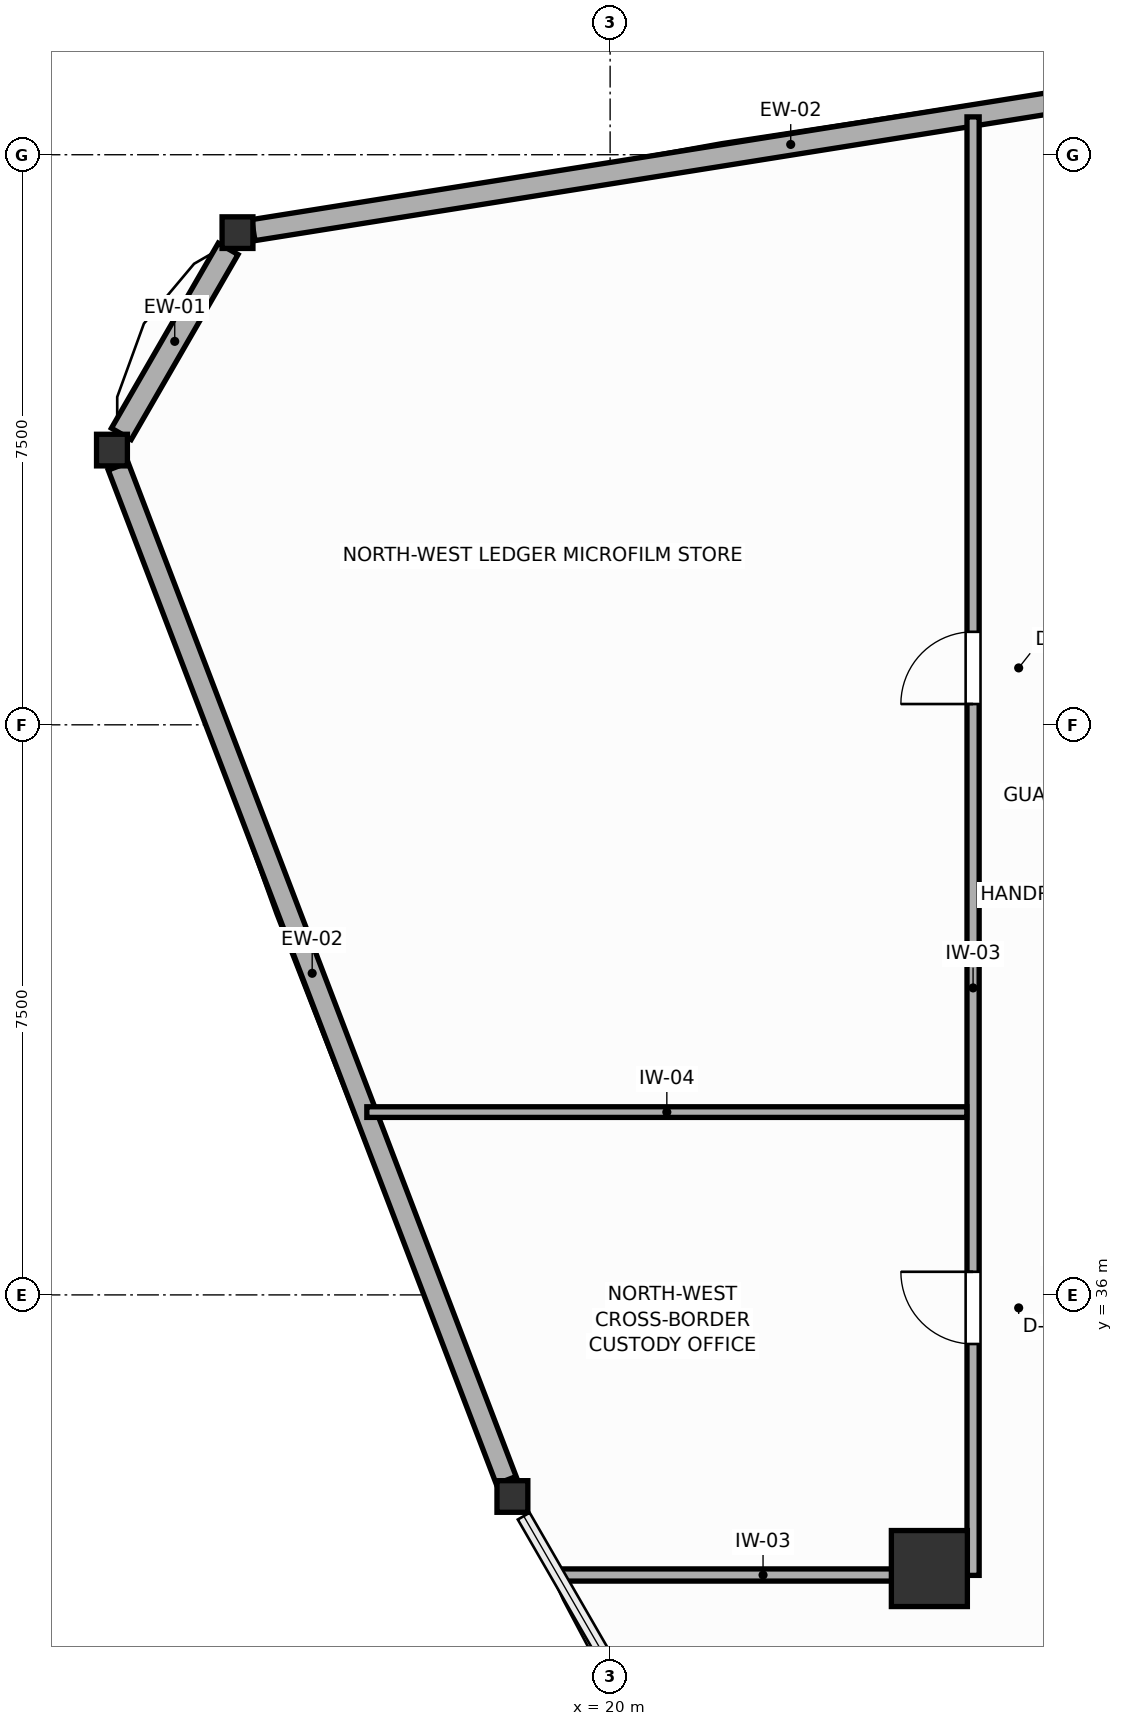
"""IFC4 building model, lengths in metres.
Left out: names, types, materials, properties, quantities, classifications, styles, units other than length and angle.
Written with IfcOpenShell. Run it as: python <this file> out.ifc"""

import sys

from ifc_helpers import new_model, si_unit, direction, frame, frame_2d, origin, origin_2d, place, context, subcontext, project, spatial, rectangle, i_section, extrude, source, transform, mapped, element, fill, save


model = new_model("IFC4")
c1 = context("Model", 3, precision=1e-05, world=origin(), true_north=direction((0.0, 1.0)))
c2 = subcontext(c1, "Body", "Model", "MODEL_VIEW")
j1 = project(units=[si_unit("LENGTHUNIT", "METRE"), si_unit("PLANEANGLEUNIT", "RADIAN")], contexts=[c1])
p1 = place(None, origin())
s1 = spatial("IfcSite", under=j1, at=p1, CompositionType="ELEMENT")
p2 = place(p1, origin())
s2 = spatial("IfcBuilding", under=s1, at=p2, CompositionType="ELEMENT")
p3 = place(p2, frame((0.0, 0.0, 175.8)))
s3 = spatial("IfcBuildingStorey", under=s2, at=p3, CompositionType="ELEMENT", Elevation=175.8)
m1 = source(origin(), c2, "Body", "SweptSolid", [
    extrude(rectangle(XDim=1.0, YDim=1.0, at=origin_2d()), origin(), (0.0, 0.0, 1.0), 3.6),
])
p4 = place(p3, frame((24.2, 32.4, 0.0), z_axis=(0.0, 0.0, 1.0), x_axis=(1.0, 0.0, 0.0)))
e1 = element("IfcColumn", 1, at=p4, inside=s3, PredefinedType="COLUMN", context=c2, shape_type="MappedRepresentation", body=[
    mapped(m1, transform((0.0, 0.0, 0.0), scale=1.0)),
])
m2 = source(origin(), c2, "Body", "SweptSolid", [
    extrude(i_section(OverallWidth=0.406, OverallDepth=0.416, WebThickness=0.027, FlangeThickness=0.044, FilletRadius=0.015, at=origin_2d()), origin(), (0.0, 0.0, 1.0), 3.6),
])
for number, where, z_axis, x_axis in (
    (2, (15.098, 49.975, 0.0), (0.0, 0.0, 1.0), (1.0, 0.0, 0.0)),
    (3, (13.446, 47.115, 0.0), (0.0, 0.0, 1.0), (1.0, 0.0, 0.0)),
    (4, (18.714, 33.348, 0.0), (0.0, 0.0, 1.0), (1.0, 0.0, 0.0)),
):
    element("IfcColumn", number, at=place(p3, frame(where, z_axis=z_axis, x_axis=x_axis)), inside=s3, PredefinedType="COLUMN", context=c2, shape_type="MappedRepresentation", body=[
        mapped(m2, transform((0.0, 0.0, 0.0), scale=1.0)),
    ])
p5 = place(p3, frame((29.446, 52.263, 0.0), z_axis=(0.0, 0.0, 1.0), x_axis=(-0.987528363291, -0.157441200757, 0.0)))
e5 = element("IfcWall", 5, at=p5, inside=s3, PredefinedType="SOLIDWALL", context=c2, shape_type="SweptSolid", body=[
    extrude(rectangle(XDim=14.319, YDim=0.28, at=frame_2d((7.159, 0.0))), origin(), (0.0, 0.0, 1.0), 1.87),
])
p6 = place(p3, frame((14.975, 49.762, 0.0), z_axis=(0.0, 0.0, 1.0), x_axis=(-0.499978056798, -0.866038072327, 0.0)))
e6 = element("IfcWall", 6, at=p6, inside=s3, PredefinedType="SOLIDWALL", context=c2, shape_type="SweptSolid", body=[
    extrude(rectangle(XDim=2.811, YDim=0.3, at=frame_2d((1.406, 0.0))), origin(), (0.0, 0.0, 1.0), 1.87),
])
p7 = place(p3, frame((13.528, 46.901, 0.0), z_axis=(0.0, 0.0, 1.0), x_axis=(0.357407179744, -0.933948664471, 0.0)))
e7 = element("IfcWall", 7, at=p7, inside=s3, PredefinedType="SOLIDWALL", context=c2, shape_type="SweptSolid", body=[
    extrude(rectangle(XDim=14.284, YDim=0.28, at=frame_2d((7.142, 0.0))), origin(), (0.0, 0.0, 1.0), 1.87),
])
p8 = place(p3, frame((24.775, 32.31, 0.0), z_axis=(0.0, 0.0, 1.0), x_axis=(0.0, 1.0, 0.0)))
e8 = element("IfcWall", 8, at=p8, inside=s3, PredefinedType="PARTITIONING", context=c2, shape_type="SweptSolid", body=[
    extrude(rectangle(XDim=19.188, YDim=0.16, at=frame_2d((9.594, 0.0))), origin(), (0.0, 0.0, 1.0), 3.4),
])
p9 = place(p8, frame((3.044, 0.0, 0.0)))
e9 = element("IfcOpeningElement", 9, at=p9, cuts=e8, PredefinedType="OPENING", context=c2, shape_type="SweptSolid", body=[
    extrude(rectangle(XDim=0.95, YDim=2.05, at=frame_2d((0.475, 1.025))), frame((0.0, 0.09, 0.0), z_axis=(0.0, -1.0, 0.0), x_axis=(1.0, 0.0, 0.0)), (0.0, 0.0, 1.0), 0.18),
])
p10 = place(p8, frame((11.463, 0.0, 0.0)))
e10 = element("IfcOpeningElement", 10, at=p10, cuts=e8, PredefinedType="OPENING", context=c2, shape_type="SweptSolid", body=[
    extrude(rectangle(XDim=0.95, YDim=2.05, at=frame_2d((0.475, 1.025))), frame((0.0, 0.09, 0.0), z_axis=(0.0, -1.0, 0.0), x_axis=(1.0, 0.0, 0.0)), (0.0, 0.0, 1.0), 0.18),
])
p11 = place(p3, frame((19.331, 32.315, 0.0), z_axis=(0.0, 0.0, 1.0), x_axis=(1.0, 0.0, 0.0)))
e11 = element("IfcWall", 11, at=p11, inside=s3, PredefinedType="PARTITIONING", context=c2, shape_type="SweptSolid", body=[
    extrude(rectangle(XDim=5.362, YDim=0.16, at=frame_2d((2.681, 0.0))), origin(), (0.0, 0.0, 1.0), 2.16),
])
p12 = place(p3, frame((16.799, 38.405, 0.0), z_axis=(0.0, 0.0, 1.0), x_axis=(1.0, 0.0, 0.0)))
e12 = element("IfcWall", 12, at=p12, inside=s3, PredefinedType="PARTITIONING", context=c2, shape_type="SweptSolid", body=[
    extrude(rectangle(XDim=7.894, YDim=0.14, at=frame_2d((3.947, 0.0))), origin(), (0.0, 0.0, 1.0), 3.4),
])
p13 = place(p9, origin())
e13 = element("IfcDoor", 13, at=p13, inside=s3, OperationType="SINGLE_SWING_RIGHT", PredefinedType="DOOR", context=c2, shape_type="SweptSolid", body=[
    extrude(rectangle(XDim=0.95, YDim=2.05, at=frame_2d((0.475, 1.025))), frame((0.0, 0.025, 0.0), z_axis=(0.0, -1.0, 0.0), x_axis=(1.0, 0.0, 0.0)), (0.0, 0.0, 1.0), 0.05),
])
fill(e9, e13)
p14 = place(p10, origin())
e14 = element("IfcDoor", 14, at=p14, inside=s3, OperationType="SINGLE_SWING_LEFT", PredefinedType="DOOR", context=c2, shape_type="SweptSolid", body=[
    extrude(rectangle(XDim=0.95, YDim=2.05, at=frame_2d((0.475, 1.025))), frame((0.0, 0.025, 0.0), z_axis=(0.0, -1.0, 0.0), x_axis=(1.0, 0.0, 0.0)), (0.0, 0.0, 1.0), 0.05),
])
fill(e10, e14)
save(model, sys.argv[1])
